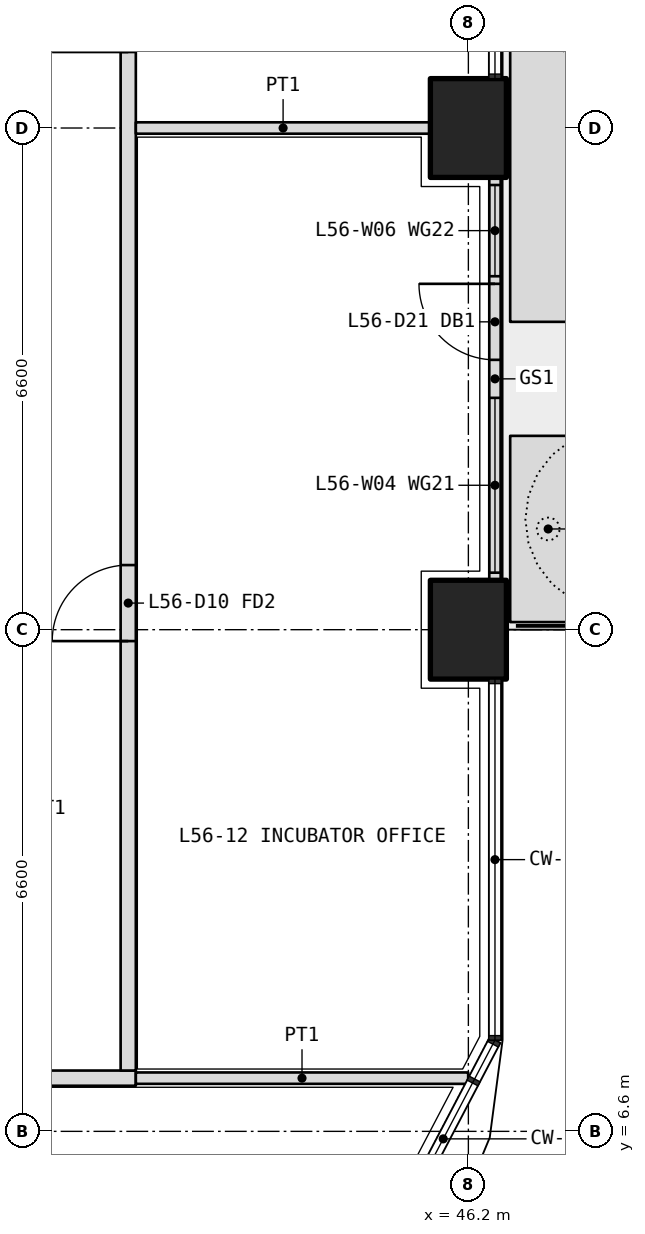
"""IFC4 building model, lengths in metres.
Left out: names, types, materials, properties, quantities, classifications, styles, units other than length and angle.
Written with IfcOpenShell. Run it as: python <this file> out.ifc"""

import sys

from ifc_helpers import new_model, si_unit, direction, frame, frame_2d, origin, origin_2d, place, context, subcontext, project, spatial, polyline, rectangle, outline, extrude, element, fill, save


model = new_model("IFC4")
c1 = context("Model", 3, precision=1e-05, world=origin(), true_north=direction((0.0, 1.0)))
c2 = subcontext(c1, "Body", "Model", "MODEL_VIEW")
j1 = project(units=[si_unit("LENGTHUNIT", "METRE"), si_unit("PLANEANGLEUNIT", "RADIAN")], contexts=[c1])
p1 = place(None, origin())
s1 = spatial("IfcSite", under=j1, at=p1, CompositionType="ELEMENT")
p2 = place(p1, origin())
s2 = spatial("IfcBuilding", under=s1, at=p2, CompositionType="ELEMENT")
p3 = place(p2, frame((0.0, 0.0, 246.0)))
s3 = spatial("IfcBuildingStorey", under=s2, at=p3, CompositionType="ELEMENT", Elevation=246.0)
for number, where, z_axis, x_axis in (
    (1, (46.2, 13.2, 0.0), (0.0, 0.0, 1.0), (0.0, 1.0, 0.0)),
    (2, (46.2, 19.8, 0.0), (0.0, 0.0, 1.0), (0.0, 1.0, 0.0)),
):
    element("IfcColumn", number, at=place(p3, frame(where, z_axis=z_axis, x_axis=x_axis)), inside=s3, PredefinedType="COLUMN", context=c2, shape_type="SweptSolid", body=[
        extrude(rectangle(XDim=1.3, YDim=1.0, at=origin_2d()), origin(), (0.0, 0.0, 1.0), 4.2),
    ])
p4 = place(p3, origin())
e3 = element("IfcWall", 3, at=p4, inside=s3, PredefinedType="USERDEFINED", context=c2, shape_type="SweptSolid", body=[
    extrude(outline(polyline([(46.75, 13.3), (47.75, 13.3), (47.75, 15.75), (46.75, 15.75), (46.75, 13.3)]), holes=[polyline([(46.9, 13.45), (47.6, 13.45), (47.6, 15.6), (46.9, 15.6), (46.9, 13.45)])]), origin(), (0.0, 0.0, 1.0), 1.05),
])
p5 = place(p3, origin())
e4 = element("IfcWall", 4, at=p5, inside=s3, PredefinedType="USERDEFINED", context=c2, shape_type="SweptSolid", body=[
    extrude(outline(polyline([(46.75, 17.25), (47.75, 17.25), (47.75, 26.3), (46.75, 26.3), (46.75, 17.25)]), holes=[polyline([(46.9, 17.4), (47.6, 17.4), (47.6, 26.15), (46.9, 26.15), (46.9, 17.4)])]), origin(), (0.0, 0.0, 1.0), 1.05),
])
p6 = place(p3, frame((46.55, 13.85, 0.0), z_axis=(0.0, 0.0, 1.0), x_axis=(0.0, 1.0, 0.0)))
e5 = element("IfcWall", 5, at=p6, inside=s3, PredefinedType="SOLIDWALL", context=c2, shape_type="SweptSolid", body=[
    extrude(rectangle(XDim=5.3, YDim=0.15, at=frame_2d((2.65, 0.0))), origin(), (0.0, 0.0, 1.0), 2.7),
])
p7 = place(p6, frame((2.9, 0.0, 0.0)))
e6 = element("IfcOpeningElement", 6, at=p7, cuts=e5, PredefinedType="OPENING", context=c2, shape_type="SweptSolid", body=[
    extrude(rectangle(XDim=1.0, YDim=2.4, at=frame_2d((0.5, 1.2))), frame((0.0, 0.085, 0.0), z_axis=(0.0, -1.0, 0.0), x_axis=(1.0, 0.0, 0.0)), (0.0, 0.0, 1.0), 0.17),
])
p8 = place(p6, frame((0.1, 0.0, 0.1)))
e7 = element("IfcOpeningElement", 7, at=p8, cuts=e5, PredefinedType="OPENING", context=c2, shape_type="SweptSolid", body=[
    extrude(rectangle(XDim=2.3, YDim=2.3, at=frame_2d((1.15, 1.15))), frame((0.0, 0.085, 0.0), z_axis=(0.0, -1.0, 0.0), x_axis=(1.0, 0.0, 0.0)), (0.0, 0.0, 1.0), 0.17),
])
p9 = place(p6, frame((4.0, 0.0, 0.1)))
e8 = element("IfcOpeningElement", 8, at=p9, cuts=e5, PredefinedType="OPENING", context=c2, shape_type="SweptSolid", body=[
    extrude(rectangle(XDim=1.2, YDim=2.3, at=frame_2d((0.6, 1.15))), frame((0.0, 0.085, 0.0), z_axis=(0.0, -1.0, 0.0), x_axis=(1.0, 0.0, 0.0)), (0.0, 0.0, 1.0), 0.17),
])
p10 = place(p3, frame((10.975, 7.3, 0.0), z_axis=(0.0, 0.0, 1.0), x_axis=(1.0, 0.0, 0.0)))
e9 = element("IfcWall", 9, at=p10, inside=s3, PredefinedType="PARTITIONING", context=c2, shape_type="SweptSolid", body=[
    extrude(rectangle(XDim=30.85, YDim=0.2, at=frame_2d((15.425, 0.0))), origin(), (0.0, 0.0, 1.0), 3.0),
])
p11 = place(p10, frame((3.863, 0.0, 0.0)))
e10 = element("IfcOpeningElement", 10, at=p11, cuts=e9, PredefinedType="OPENING", context=c2, shape_type="SweptSolid", body=[
    extrude(rectangle(XDim=1.2, YDim=2.1, at=frame_2d((0.6, 1.05))), frame((0.0, 0.11, 0.0), z_axis=(0.0, -1.0, 0.0), x_axis=(1.0, 0.0, 0.0)), (0.0, 0.0, 1.0), 0.22),
])
p12 = place(p10, frame((16.575, 0.0, 0.0)))
e11 = element("IfcOpeningElement", 11, at=p12, cuts=e9, PredefinedType="OPENING", context=c2, shape_type="SweptSolid", body=[
    extrude(rectangle(XDim=1.0, YDim=2.1, at=frame_2d((0.5, 1.05))), frame((0.0, 0.11, 0.0), z_axis=(0.0, -1.0, 0.0), x_axis=(1.0, 0.0, 0.0)), (0.0, 0.0, 1.0), 0.22),
])
p13 = place(p10, frame((27.538, 0.0, 0.0)))
e12 = element("IfcOpeningElement", 12, at=p13, cuts=e9, PredefinedType="OPENING", context=c2, shape_type="SweptSolid", body=[
    extrude(rectangle(XDim=1.0, YDim=2.1, at=frame_2d((0.5, 1.05))), frame((0.0, 0.11, 0.0), z_axis=(0.0, -1.0, 0.0), x_axis=(1.0, 0.0, 0.0)), (0.0, 0.0, 1.0), 0.22),
])
p14 = place(p3, frame((41.725, 7.4, 0.0), z_axis=(0.0, 0.0, 1.0), x_axis=(0.0, 1.0, 0.0)))
e13 = element("IfcWall", 13, at=p14, inside=s3, PredefinedType="PARTITIONING", context=c2, shape_type="SweptSolid", body=[
    extrude(rectangle(XDim=31.4, YDim=0.2, at=frame_2d((15.7, 0.0))), origin(), (0.0, 0.0, 1.0), 3.0),
])
p15 = place(p14, frame((5.65, 0.0, 0.0)))
e14 = element("IfcOpeningElement", 14, at=p15, cuts=e13, PredefinedType="OPENING", context=c2, shape_type="SweptSolid", body=[
    extrude(rectangle(XDim=1.0, YDim=2.1, at=frame_2d((0.5, 1.05))), frame((0.0, 0.11, 0.0), z_axis=(0.0, -1.0, 0.0), x_axis=(1.0, 0.0, 0.0)), (0.0, 0.0, 1.0), 0.22),
])
p16 = place(p14, frame((13.4, 0.0, 0.0)))
e15 = element("IfcOpeningElement", 15, at=p16, cuts=e13, PredefinedType="OPENING", context=c2, shape_type="SweptSolid", body=[
    extrude(rectangle(XDim=1.0, YDim=2.1, at=frame_2d((0.5, 1.05))), frame((0.0, 0.11, 0.0), z_axis=(0.0, -1.0, 0.0), x_axis=(1.0, 0.0, 0.0)), (0.0, 0.0, 1.0), 0.22),
])
p17 = place(p14, frame((16.75, 0.0, 0.0)))
e16 = element("IfcOpeningElement", 16, at=p17, cuts=e13, PredefinedType="OPENING", context=c2, shape_type="SweptSolid", body=[
    extrude(rectangle(XDim=0.9, YDim=2.1, at=frame_2d((0.45, 1.05))), frame((0.0, 0.11, 0.0), z_axis=(0.0, -1.0, 0.0), x_axis=(1.0, 0.0, 0.0)), (0.0, 0.0, 1.0), 0.22),
])
p18 = place(p14, frame((21.8, 0.0, 0.0)))
e17 = element("IfcOpeningElement", 17, at=p18, cuts=e13, PredefinedType="OPENING", context=c2, shape_type="SweptSolid", body=[
    extrude(rectangle(XDim=1.0, YDim=2.1, at=frame_2d((0.5, 1.05))), frame((0.0, 0.11, 0.0), z_axis=(0.0, -1.0, 0.0), x_axis=(1.0, 0.0, 0.0)), (0.0, 0.0, 1.0), 0.22),
])
p19 = place(p14, frame((28.05, 0.0, 0.0)))
e18 = element("IfcOpeningElement", 18, at=p19, cuts=e13, PredefinedType="OPENING", context=c2, shape_type="SweptSolid", body=[
    extrude(rectangle(XDim=1.0, YDim=2.1, at=frame_2d((0.5, 1.05))), frame((0.0, 0.11, 0.0), z_axis=(0.0, -1.0, 0.0), x_axis=(1.0, 0.0, 0.0)), (0.0, 0.0, 1.0), 0.22),
])
p20 = place(p3, frame((46.198, 7.3, 0.0), z_axis=(0.0, 0.0, 1.0), x_axis=(-1.0, 0.0, 0.0)))
e19 = element("IfcWall", 19, at=p20, inside=s3, PredefinedType="PARTITIONING", context=c2, shape_type="SweptSolid", body=[
    extrude(rectangle(XDim=4.373, YDim=0.15, at=frame_2d((2.186, 0.0))), origin(), (0.0, 0.0, 1.0), 2.7),
])
p21 = place(p3, frame((45.7, 19.8, 0.0), z_axis=(0.0, 0.0, 1.0), x_axis=(-1.0, 0.0, 0.0)))
e20 = element("IfcWall", 20, at=p21, inside=s3, PredefinedType="PARTITIONING", context=c2, shape_type="SweptSolid", body=[
    extrude(rectangle(XDim=3.875, YDim=0.15, at=frame_2d((1.938, 0.0))), origin(), (0.0, 0.0, 1.0), 3.0),
])
p22 = place(p7, origin())
e21 = element("IfcDoor", 21, at=p22, inside=s3, OperationType="SINGLE_SWING_RIGHT", PredefinedType="DOOR", context=c2, shape_type="SweptSolid", body=[
    extrude(rectangle(XDim=1.0, YDim=2.4, at=frame_2d((0.5, 1.2))), frame((0.0, 0.025, 0.0), z_axis=(0.0, -1.0, 0.0), x_axis=(1.0, 0.0, 0.0)), (0.0, 0.0, 1.0), 0.05),
])
fill(e6, e21)
p23 = place(p8, origin())
e22 = element("IfcWindow", 22, at=p23, inside=s3, PartitioningType="SINGLE_PANEL", PredefinedType="WINDOW", context=c2, shape_type="SweptSolid", body=[
    extrude(rectangle(XDim=2.3, YDim=2.3, at=frame_2d((1.15, 1.15))), frame((0.0, 0.03, 0.0), z_axis=(0.0, -1.0, 0.0), x_axis=(1.0, 0.0, 0.0)), (0.0, 0.0, 1.0), 0.06),
])
fill(e7, e22)
p24 = place(p9, origin())
e23 = element("IfcWindow", 23, at=p24, inside=s3, PartitioningType="SINGLE_PANEL", PredefinedType="WINDOW", context=c2, shape_type="SweptSolid", body=[
    extrude(rectangle(XDim=1.2, YDim=2.3, at=frame_2d((0.6, 1.15))), frame((0.0, 0.03, 0.0), z_axis=(0.0, -1.0, 0.0), x_axis=(1.0, 0.0, 0.0)), (0.0, 0.0, 1.0), 0.06),
])
fill(e8, e23)
p25 = place(p15, origin())
e24 = element("IfcDoor", 24, at=p25, inside=s3, OperationType="SINGLE_SWING_LEFT", PredefinedType="DOOR", context=c2, shape_type="SweptSolid", body=[
    extrude(rectangle(XDim=1.0, YDim=2.1, at=frame_2d((0.5, 1.05))), frame((0.0, 0.025, 0.0), z_axis=(0.0, -1.0, 0.0), x_axis=(1.0, 0.0, 0.0)), (0.0, 0.0, 1.0), 0.05),
])
fill(e14, e24)
p26 = place(p16, origin())
e25 = element("IfcDoor", 25, at=p26, inside=s3, OperationType="SINGLE_SWING_LEFT", PredefinedType="DOOR", context=c2, shape_type="SweptSolid", body=[
    extrude(rectangle(XDim=1.0, YDim=2.1, at=frame_2d((0.5, 1.05))), frame((0.0, 0.025, 0.0), z_axis=(0.0, -1.0, 0.0), x_axis=(1.0, 0.0, 0.0)), (0.0, 0.0, 1.0), 0.05),
])
fill(e15, e25)
save(model, sys.argv[1])
